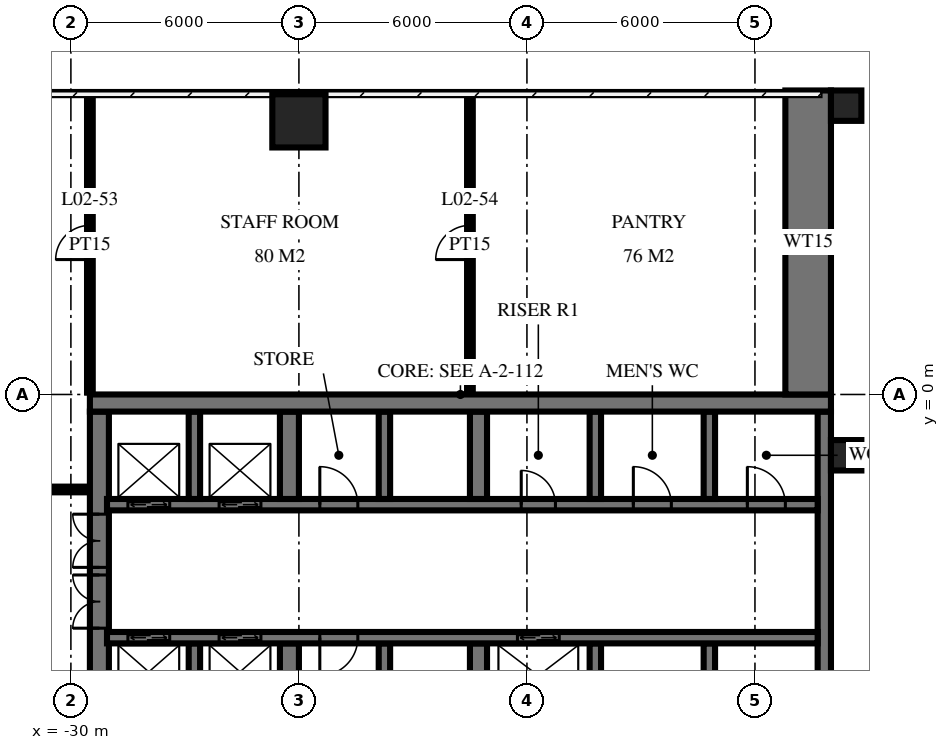
"""IFC4 building model, lengths in metres.
Left out: names, types, materials, properties, quantities, classifications, styles, units other than length and angle.
Written with IfcOpenShell. Run it as: python <this file> out.ifc"""

import sys

from ifc_helpers import new_model, si_unit, direction, frame, frame_2d, origin, origin_2d, place, context, subcontext, project, spatial, rectangle, circle, extrude, element, fill, save


model = new_model("IFC4")
c1 = context("Model", 3, precision=1e-05, world=origin(), true_north=direction((0.0, 1.0)))
c2 = subcontext(c1, "Body", "Model", "MODEL_VIEW")
j1 = project(units=[si_unit("LENGTHUNIT", "METRE"), si_unit("PLANEANGLEUNIT", "RADIAN")], contexts=[c1])
p1 = place(None, origin())
s1 = spatial("IfcSite", under=j1, at=p1, CompositionType="ELEMENT")
p2 = place(p1, origin())
s2 = spatial("IfcBuilding", under=s1, at=p2, CompositionType="ELEMENT")
p3 = place(p2, frame((0.0, 0.0, 12.5)))
s3 = spatial("IfcBuildingStorey", under=s2, at=p3, CompositionType="ELEMENT", Elevation=12.5)
p4 = place(p3, frame((-24.0, 7.2, 0.0), z_axis=(0.0, 0.0, 1.0), x_axis=(1.0, 0.0, 0.0)))
e1 = element("IfcColumn", 1, at=p4, inside=s3, PredefinedType="COLUMN", context=c2, shape_type="SweptSolid", body=[
    extrude(circle(Radius=0.7, at=origin_2d()), origin(), (0.0, 0.0, 1.0), 5.5),
])
p5 = place(p3, frame((-29.5, -0.225, 0.0), z_axis=(0.0, 0.0, 1.0), x_axis=(1.0, 0.0, 0.0)))
e2 = element("IfcWall", 2, at=p5, inside=s3, PredefinedType="SHEAR", context=c2, shape_type="SweptSolid", body=[
    extrude(rectangle(XDim=19.5, YDim=0.45, at=frame_2d((9.75, 0.0))), origin(), (0.0, 0.0, 1.0), 5.5),
])
p6 = place(p3, frame((-10.175, -14.55, 0.0), z_axis=(0.0, 0.0, 1.0), x_axis=(0.0, 1.0, 0.0)))
e3 = element("IfcWall", 3, at=p6, inside=s3, PredefinedType="SHEAR", context=c2, shape_type="SweptSolid", body=[
    extrude(rectangle(XDim=14.1, YDim=0.35, at=frame_2d((7.05, 0.0))), origin(), (0.0, 0.0, 1.0), 5.5),
])
p7 = place(p3, frame((-29.25, -14.55, 0.0), z_axis=(0.0, 0.0, 1.0), x_axis=(0.0, 1.0, 0.0)))
e4 = element("IfcWall", 4, at=p7, inside=s3, PredefinedType="SHEAR", context=c2, shape_type="SweptSolid", body=[
    extrude(rectangle(XDim=14.1, YDim=0.5, at=frame_2d((7.05, 0.0))), origin(), (0.0, 0.0, 1.0), 5.5),
])
p8 = place(p7, frame((8.4, 0.0, 0.0)))
e5 = element("IfcOpeningElement", 5, at=p8, cuts=e4, PredefinedType="OPENING", context=c2, shape_type="SweptSolid", body=[
    extrude(rectangle(XDim=1.4, YDim=2.4, at=frame_2d((0.7, 1.2))), frame((0.0, 0.26, 0.0), z_axis=(0.0, -1.0, 0.0), x_axis=(1.0, 0.0, 0.0)), (0.0, 0.0, 1.0), 0.52),
])
p9 = place(p7, frame((10.0, 0.0, 0.0)))
e6 = element("IfcOpeningElement", 6, at=p9, cuts=e4, PredefinedType="OPENING", context=c2, shape_type="SweptSolid", body=[
    extrude(rectangle(XDim=1.4, YDim=2.4, at=frame_2d((0.7, 1.2))), frame((0.0, 0.26, 0.0), z_axis=(0.0, -1.0, 0.0), x_axis=(1.0, 0.0, 0.0)), (0.0, 0.0, 1.0), 0.52),
])
p10 = place(p3, frame((-29.05, -2.9, 0.0), z_axis=(0.0, 0.0, 1.0), x_axis=(1.0, 0.0, 0.0)))
e7 = element("IfcWall", 7, at=p10, inside=s3, PredefinedType="SHEAR", context=c2, shape_type="SweptSolid", body=[
    extrude(rectangle(XDim=18.7, YDim=0.3, at=frame_2d((9.35, 0.0))), origin(), (0.0, 0.0, 1.0), 5.5),
])
p11 = place(p10, frame((2.95, 0.0, 0.0)))
e8 = element("IfcOpeningElement", 8, at=p11, cuts=e7, PredefinedType="OPENING", context=c2, shape_type="SweptSolid", body=[
    extrude(rectangle(XDim=1.1, YDim=2.1, at=frame_2d((0.55, 1.05))), frame((0.0, 0.16, 0.0), z_axis=(0.0, -1.0, 0.0), x_axis=(1.0, 0.0, 0.0)), (0.0, 0.0, 1.0), 0.32),
])
p12 = place(p10, frame((0.55, 0.0, 0.0)))
e9 = element("IfcOpeningElement", 9, at=p12, cuts=e7, PredefinedType="OPENING", context=c2, shape_type="SweptSolid", body=[
    extrude(rectangle(XDim=1.1, YDim=2.1, at=frame_2d((0.55, 1.05))), frame((0.0, 0.16, 0.0), z_axis=(0.0, -1.0, 0.0), x_axis=(1.0, 0.0, 0.0)), (0.0, 0.0, 1.0), 0.32),
])
p13 = place(p10, frame((10.9, 0.0, 0.0)))
e10 = element("IfcOpeningElement", 10, at=p13, cuts=e7, PredefinedType="OPENING", context=c2, shape_type="SweptSolid", body=[
    extrude(rectangle(XDim=0.9, YDim=2.1, at=frame_2d((0.45, 1.05))), frame((0.0, 0.16, 0.0), z_axis=(0.0, -1.0, 0.0), x_axis=(1.0, 0.0, 0.0)), (0.0, 0.0, 1.0), 0.32),
])
p14 = place(p10, frame((16.85, 0.0, 0.0)))
e11 = element("IfcOpeningElement", 11, at=p14, cuts=e7, PredefinedType="OPENING", context=c2, shape_type="SweptSolid", body=[
    extrude(rectangle(XDim=1.0, YDim=2.1, at=frame_2d((0.5, 1.05))), frame((0.0, 0.16, 0.0), z_axis=(0.0, -1.0, 0.0), x_axis=(1.0, 0.0, 0.0)), (0.0, 0.0, 1.0), 0.32),
])
p15 = place(p10, frame((13.85, 0.0, 0.0)))
e12 = element("IfcOpeningElement", 12, at=p15, cuts=e7, PredefinedType="OPENING", context=c2, shape_type="SweptSolid", body=[
    extrude(rectangle(XDim=1.0, YDim=2.1, at=frame_2d((0.5, 1.05))), frame((0.0, 0.16, 0.0), z_axis=(0.0, -1.0, 0.0), x_axis=(1.0, 0.0, 0.0)), (0.0, 0.0, 1.0), 0.32),
])
p16 = place(p10, frame((5.6, 0.0, 0.0)))
e13 = element("IfcOpeningElement", 13, at=p16, cuts=e7, PredefinedType="OPENING", context=c2, shape_type="SweptSolid", body=[
    extrude(rectangle(XDim=1.0, YDim=2.1, at=frame_2d((0.5, 1.05))), frame((0.0, 0.16, 0.0), z_axis=(0.0, -1.0, 0.0), x_axis=(1.0, 0.0, 0.0)), (0.0, 0.0, 1.0), 0.32),
])
p17 = place(p3, frame((-29.05, -6.4, 0.0), z_axis=(0.0, 0.0, 1.0), x_axis=(1.0, 0.0, 0.0)))
e14 = element("IfcWall", 14, at=p17, inside=s3, PredefinedType="SHEAR", context=c2, shape_type="SweptSolid", body=[
    extrude(rectangle(XDim=18.7, YDim=0.3, at=frame_2d((9.35, 0.0))), origin(), (0.0, 0.0, 1.0), 5.5),
])
p18 = place(p17, frame((2.95, 0.0, 0.0)))
e15 = element("IfcOpeningElement", 15, at=p18, cuts=e14, PredefinedType="OPENING", context=c2, shape_type="SweptSolid", body=[
    extrude(rectangle(XDim=1.1, YDim=2.1, at=frame_2d((0.55, 1.05))), frame((0.0, 0.16, 0.0), z_axis=(0.0, -1.0, 0.0), x_axis=(1.0, 0.0, 0.0)), (0.0, 0.0, 1.0), 0.32),
])
p19 = place(p17, frame((0.55, 0.0, 0.0)))
e16 = element("IfcOpeningElement", 16, at=p19, cuts=e14, PredefinedType="OPENING", context=c2, shape_type="SweptSolid", body=[
    extrude(rectangle(XDim=1.1, YDim=2.1, at=frame_2d((0.55, 1.05))), frame((0.0, 0.16, 0.0), z_axis=(0.0, -1.0, 0.0), x_axis=(1.0, 0.0, 0.0)), (0.0, 0.0, 1.0), 0.32),
])
p20 = place(p17, frame((10.8, 0.0, 0.0)))
e17 = element("IfcOpeningElement", 17, at=p20, cuts=e14, PredefinedType="OPENING", context=c2, shape_type="SweptSolid", body=[
    extrude(rectangle(XDim=1.1, YDim=2.1, at=frame_2d((0.55, 1.05))), frame((0.0, 0.16, 0.0), z_axis=(0.0, -1.0, 0.0), x_axis=(1.0, 0.0, 0.0)), (0.0, 0.0, 1.0), 0.32),
])
p21 = place(p17, frame((5.6, 0.0, 0.0)))
e18 = element("IfcOpeningElement", 18, at=p21, cuts=e14, PredefinedType="OPENING", context=c2, shape_type="SweptSolid", body=[
    extrude(rectangle(XDim=1.0, YDim=2.1, at=frame_2d((0.5, 1.05))), frame((0.0, 0.16, 0.0), z_axis=(0.0, -1.0, 0.0), x_axis=(1.0, 0.0, 0.0)), (0.0, 0.0, 1.0), 0.32),
])
for number, where, z_axis, x_axis in (
    (19, (-13.2, -2.75, 0.0), (0.0, 0.0, 1.0), (0.0, 1.0, 0.0)),
    (20, (-13.2, -8.85, 0.0), (0.0, 0.0, 1.0), (0.0, 1.0, 0.0)),
    (21, (-16.2, -2.75, 0.0), (0.0, 0.0, 1.0), (0.0, 1.0, 0.0)),
    (22, (-16.2, -8.85, 0.0), (0.0, 0.0, 1.0), (0.0, 1.0, 0.0)),
):
    element("IfcWall", number, at=place(p3, frame(where, z_axis=z_axis, x_axis=x_axis)), inside=s3, PredefinedType="SHEAR", context=c2, shape_type="SweptSolid", body=[
        extrude(rectangle(XDim=2.3, YDim=0.3, at=frame_2d((1.15, 0.0))), origin(), (0.0, 0.0, 1.0), 5.5),
    ])
for number, where, z_axis, x_axis in (
    (23, (-19.275, -2.75, 0.0), (0.0, 0.0, 1.0), (0.0, 1.0, 0.0)),
    (24, (-19.275, -8.85, 0.0), (0.0, 0.0, 1.0), (0.0, 1.0, 0.0)),
):
    element("IfcWall", number, at=place(p3, frame(where, z_axis=z_axis, x_axis=x_axis)), inside=s3, PredefinedType="SHEAR", context=c2, shape_type="SweptSolid", body=[
        extrude(rectangle(XDim=2.3, YDim=0.45, at=frame_2d((1.15, 0.0))), origin(), (0.0, 0.0, 1.0), 5.5),
    ])
for number, where, z_axis, x_axis in (
    (25, (-21.75, -2.75, 0.0), (0.0, 0.0, 1.0), (0.0, 1.0, 0.0)),
    (26, (-21.75, -8.85, 0.0), (0.0, 0.0, 1.0), (0.0, 1.0, 0.0)),
):
    element("IfcWall", number, at=place(p3, frame(where, z_axis=z_axis, x_axis=x_axis)), inside=s3, PredefinedType="SHEAR", context=c2, shape_type="SweptSolid", body=[
        extrude(rectangle(XDim=2.3, YDim=0.3, at=frame_2d((1.15, 0.0))), origin(), (0.0, 0.0, 1.0), 5.5),
    ])
for number, where, z_axis, x_axis in (
    (27, (-24.25, -2.75, 0.0), (0.0, 0.0, 1.0), (0.0, 1.0, 0.0)),
    (28, (-24.25, -8.85, 0.0), (0.0, 0.0, 1.0), (0.0, 1.0, 0.0)),
):
    element("IfcWall", number, at=place(p3, frame(where, z_axis=z_axis, x_axis=x_axis)), inside=s3, PredefinedType="SHEAR", context=c2, shape_type="SweptSolid", body=[
        extrude(rectangle(XDim=2.3, YDim=0.5, at=frame_2d((1.15, 0.0))), origin(), (0.0, 0.0, 1.0), 5.5),
    ])
for number, where, z_axis, x_axis in (
    (29, (-26.75, -2.75, 0.0), (0.0, 0.0, 1.0), (0.0, 1.0, 0.0)),
    (30, (-26.75, -8.85, 0.0), (0.0, 0.0, 1.0), (0.0, 1.0, 0.0)),
):
    element("IfcWall", number, at=place(p3, frame(where, z_axis=z_axis, x_axis=x_axis)), inside=s3, PredefinedType="SHEAR", context=c2, shape_type="SweptSolid", body=[
        extrude(rectangle(XDim=2.3, YDim=0.3, at=frame_2d((1.15, 0.0))), origin(), (0.0, 0.0, 1.0), 5.5),
    ])
p22 = place(p3, frame((-10.6, 0.0, 0.0), z_axis=(0.0, 0.0, 1.0), x_axis=(0.0, 1.0, 0.0)))
e31 = element("IfcWall", 31, at=p22, inside=s3, PredefinedType="SHEAR", context=c2, shape_type="SweptSolid", body=[
    extrude(rectangle(XDim=8.0, YDim=1.2, at=frame_2d((4.0, 0.0))), origin(), (0.0, 0.0, 1.0), 5.5),
])
for number, where, z_axis, x_axis in (
    (32, (-9.6, -1.6, 0.0), (0.0, 0.0, 1.0), (1.0, 0.0, 0.0)),
    (33, (-9.6, 7.6, 0.0), (0.0, 0.0, 1.0), (1.0, 0.0, 0.0)),
):
    element("IfcColumn", number, at=place(p3, frame(where, z_axis=z_axis, x_axis=x_axis)), inside=s3, PredefinedType="COLUMN", context=c2, shape_type="SweptSolid", body=[
        extrude(rectangle(XDim=0.8, YDim=0.8, at=origin_2d()), origin(), (0.0, 0.0, 1.0), 4.25),
    ])
p23 = place(p3, frame((-19.5, 0.05, 0.0), z_axis=(0.0, 0.0, 1.0), x_axis=(0.0, 1.0, 0.0)))
e34 = element("IfcWall", 34, at=p23, inside=s3, PredefinedType="PARTITIONING", context=c2, shape_type="SweptSolid", body=[
    extrude(rectangle(XDim=7.77, YDim=0.15, at=frame_2d((3.885, 0.0))), origin(), (0.0, 0.0, 1.0), 5.05),
])
p24 = place(p23, frame((3.5, 0.0, 0.0)))
e35 = element("IfcOpeningElement", 35, at=p24, cuts=e34, PredefinedType="OPENING", context=c2, shape_type="SweptSolid", body=[
    extrude(rectangle(XDim=0.9, YDim=2.1, at=frame_2d((0.45, 1.05))), frame((0.0, 0.085, 0.0), z_axis=(0.0, -1.0, 0.0), x_axis=(1.0, 0.0, 0.0)), (0.0, 0.0, 1.0), 0.17),
])
p25 = place(p3, frame((-29.5, 0.05, 0.0), z_axis=(0.0, 0.0, 1.0), x_axis=(0.0, 1.0, 0.0)))
e36 = element("IfcWall", 36, at=p25, inside=s3, PredefinedType="PARTITIONING", context=c2, shape_type="SweptSolid", body=[
    extrude(rectangle(XDim=7.77, YDim=0.15, at=frame_2d((3.885, 0.0))), origin(), (0.0, 0.0, 1.0), 5.05),
])
p26 = place(p25, frame((3.5, 0.0, 0.0)))
e37 = element("IfcOpeningElement", 37, at=p26, cuts=e36, PredefinedType="OPENING", context=c2, shape_type="SweptSolid", body=[
    extrude(rectangle(XDim=0.9, YDim=2.1, at=frame_2d((0.45, 1.05))), frame((0.0, 0.085, 0.0), z_axis=(0.0, -1.0, 0.0), x_axis=(1.0, 0.0, 0.0)), (0.0, 0.0, 1.0), 0.17),
])
p27 = place(p3, frame((-31.9, -2.5, 0.0), z_axis=(0.0, 0.0, 1.0), x_axis=(1.0, 0.0, 0.0)))
e38 = element("IfcWall", 38, at=p27, inside=s3, PredefinedType="PARTITIONING", context=c2, shape_type="SweptSolid", body=[
    extrude(rectangle(XDim=2.35, YDim=0.15, at=frame_2d((1.175, 0.0))), origin(), (0.0, 0.0, 1.0), 5.05),
])
p28 = place(p11, origin())
e39 = element("IfcDoor", 39, at=p28, inside=s3, OperationType="DOUBLE_DOOR_SLIDING", PredefinedType="USERDEFINED", context=c2, shape_type="SweptSolid", body=[
    extrude(rectangle(XDim=1.1, YDim=2.1, at=frame_2d((0.55, 1.05))), frame((0.0, 0.025, 0.0), z_axis=(0.0, -1.0, 0.0), x_axis=(1.0, 0.0, 0.0)), (0.0, 0.0, 1.0), 0.05),
])
fill(e8, e39)
p29 = place(p12, origin())
e40 = element("IfcDoor", 40, at=p29, inside=s3, OperationType="DOUBLE_DOOR_SLIDING", PredefinedType="USERDEFINED", context=c2, shape_type="SweptSolid", body=[
    extrude(rectangle(XDim=1.1, YDim=2.1, at=frame_2d((0.55, 1.05))), frame((0.0, 0.025, 0.0), z_axis=(0.0, -1.0, 0.0), x_axis=(1.0, 0.0, 0.0)), (0.0, 0.0, 1.0), 0.05),
])
fill(e9, e40)
p30 = place(p18, origin())
e41 = element("IfcDoor", 41, at=p30, inside=s3, OperationType="DOUBLE_DOOR_SLIDING", PredefinedType="USERDEFINED", context=c2, shape_type="SweptSolid", body=[
    extrude(rectangle(XDim=1.1, YDim=2.1, at=frame_2d((0.55, 1.05))), frame((0.0, 0.025, 0.0), z_axis=(0.0, -1.0, 0.0), x_axis=(1.0, 0.0, 0.0)), (0.0, 0.0, 1.0), 0.05),
])
fill(e15, e41)
p31 = place(p19, origin())
e42 = element("IfcDoor", 42, at=p31, inside=s3, OperationType="DOUBLE_DOOR_SLIDING", PredefinedType="USERDEFINED", context=c2, shape_type="SweptSolid", body=[
    extrude(rectangle(XDim=1.1, YDim=2.1, at=frame_2d((0.55, 1.05))), frame((0.0, 0.025, 0.0), z_axis=(0.0, -1.0, 0.0), x_axis=(1.0, 0.0, 0.0)), (0.0, 0.0, 1.0), 0.05),
])
fill(e16, e42)
p32 = place(p20, origin())
e43 = element("IfcDoor", 43, at=p32, inside=s3, OperationType="DOUBLE_DOOR_SLIDING", PredefinedType="USERDEFINED", context=c2, shape_type="SweptSolid", body=[
    extrude(rectangle(XDim=1.1, YDim=2.1, at=frame_2d((0.55, 1.05))), frame((0.0, 0.025, 0.0), z_axis=(0.0, -1.0, 0.0), x_axis=(1.0, 0.0, 0.0)), (0.0, 0.0, 1.0), 0.05),
])
fill(e17, e43)
p33 = place(p8, origin())
e44 = element("IfcDoor", 44, at=p33, inside=s3, OperationType="DOUBLE_DOOR_SINGLE_SWING", PredefinedType="DOOR", context=c2, shape_type="SweptSolid", body=[
    extrude(rectangle(XDim=1.4, YDim=2.4, at=frame_2d((0.7, 1.2))), frame((0.0, 0.025, 0.0), z_axis=(0.0, -1.0, 0.0), x_axis=(1.0, 0.0, 0.0)), (0.0, 0.0, 1.0), 0.05),
])
fill(e5, e44)
p34 = place(p9, origin())
e45 = element("IfcDoor", 45, at=p34, inside=s3, OperationType="DOUBLE_DOOR_SINGLE_SWING", PredefinedType="DOOR", context=c2, shape_type="SweptSolid", body=[
    extrude(rectangle(XDim=1.4, YDim=2.4, at=frame_2d((0.7, 1.2))), frame((0.0, 0.025, 0.0), z_axis=(0.0, -1.0, 0.0), x_axis=(1.0, 0.0, 0.0)), (0.0, 0.0, 1.0), 0.05),
])
fill(e6, e45)
p35 = place(p13, origin())
e46 = element("IfcDoor", 46, at=p35, inside=s3, OperationType="SINGLE_SWING_RIGHT", PredefinedType="DOOR", context=c2, shape_type="SweptSolid", body=[
    extrude(rectangle(XDim=0.9, YDim=2.1, at=frame_2d((0.45, 1.05))), frame((0.0, 0.025, 0.0), z_axis=(0.0, -1.0, 0.0), x_axis=(1.0, 0.0, 0.0)), (0.0, 0.0, 1.0), 0.05),
])
fill(e10, e46)
p36 = place(p14, origin())
e47 = element("IfcDoor", 47, at=p36, inside=s3, OperationType="SINGLE_SWING_RIGHT", PredefinedType="DOOR", context=c2, shape_type="SweptSolid", body=[
    extrude(rectangle(XDim=1.0, YDim=2.1, at=frame_2d((0.5, 1.05))), frame((0.0, 0.025, 0.0), z_axis=(0.0, -1.0, 0.0), x_axis=(1.0, 0.0, 0.0)), (0.0, 0.0, 1.0), 0.05),
])
fill(e11, e47)
p37 = place(p15, origin())
e48 = element("IfcDoor", 48, at=p37, inside=s3, OperationType="SINGLE_SWING_RIGHT", PredefinedType="DOOR", context=c2, shape_type="SweptSolid", body=[
    extrude(rectangle(XDim=1.0, YDim=2.1, at=frame_2d((0.5, 1.05))), frame((0.0, 0.025, 0.0), z_axis=(0.0, -1.0, 0.0), x_axis=(1.0, 0.0, 0.0)), (0.0, 0.0, 1.0), 0.05),
])
fill(e12, e48)
p38 = place(p16, origin())
e49 = element("IfcDoor", 49, at=p38, inside=s3, OperationType="SINGLE_SWING_RIGHT", PredefinedType="DOOR", context=c2, shape_type="SweptSolid", body=[
    extrude(rectangle(XDim=1.0, YDim=2.1, at=frame_2d((0.5, 1.05))), frame((0.0, 0.025, 0.0), z_axis=(0.0, -1.0, 0.0), x_axis=(1.0, 0.0, 0.0)), (0.0, 0.0, 1.0), 0.05),
])
fill(e13, e49)
p39 = place(p21, frame((0.5, 0.0, 0.0), z_axis=(0.0, 0.0, 1.0), x_axis=(-1.0, 0.0, 0.0)))
e50 = element("IfcDoor", 50, at=p39, inside=s3, OperationType="SINGLE_SWING_LEFT", PredefinedType="DOOR", context=c2, shape_type="SweptSolid", body=[
    extrude(rectangle(XDim=1.0, YDim=2.1, at=frame_2d((0.0, 1.05))), frame((0.0, -0.025, 0.0), z_axis=(0.0, 1.0, 0.0), x_axis=(-1.0, 0.0, 0.0)), (0.0, 0.0, 1.0), 0.05),
])
fill(e18, e50)
p40 = place(p26, origin())
e51 = element("IfcDoor", 51, at=p40, inside=s3, OperationType="SINGLE_SWING_RIGHT", PredefinedType="DOOR", context=c2, shape_type="SweptSolid", body=[
    extrude(rectangle(XDim=0.9, YDim=2.1, at=frame_2d((0.45, 1.05))), frame((0.0, 0.025, 0.0), z_axis=(0.0, -1.0, 0.0), x_axis=(1.0, 0.0, 0.0)), (0.0, 0.0, 1.0), 0.05),
])
fill(e37, e51)
p41 = place(p24, origin())
e52 = element("IfcDoor", 52, at=p41, inside=s3, OperationType="SINGLE_SWING_RIGHT", PredefinedType="DOOR", context=c2, shape_type="SweptSolid", body=[
    extrude(rectangle(XDim=0.9, YDim=2.1, at=frame_2d((0.45, 1.05))), frame((0.0, 0.025, 0.0), z_axis=(0.0, -1.0, 0.0), x_axis=(1.0, 0.0, 0.0)), (0.0, 0.0, 1.0), 0.05),
])
fill(e35, e52)
save(model, sys.argv[1])
